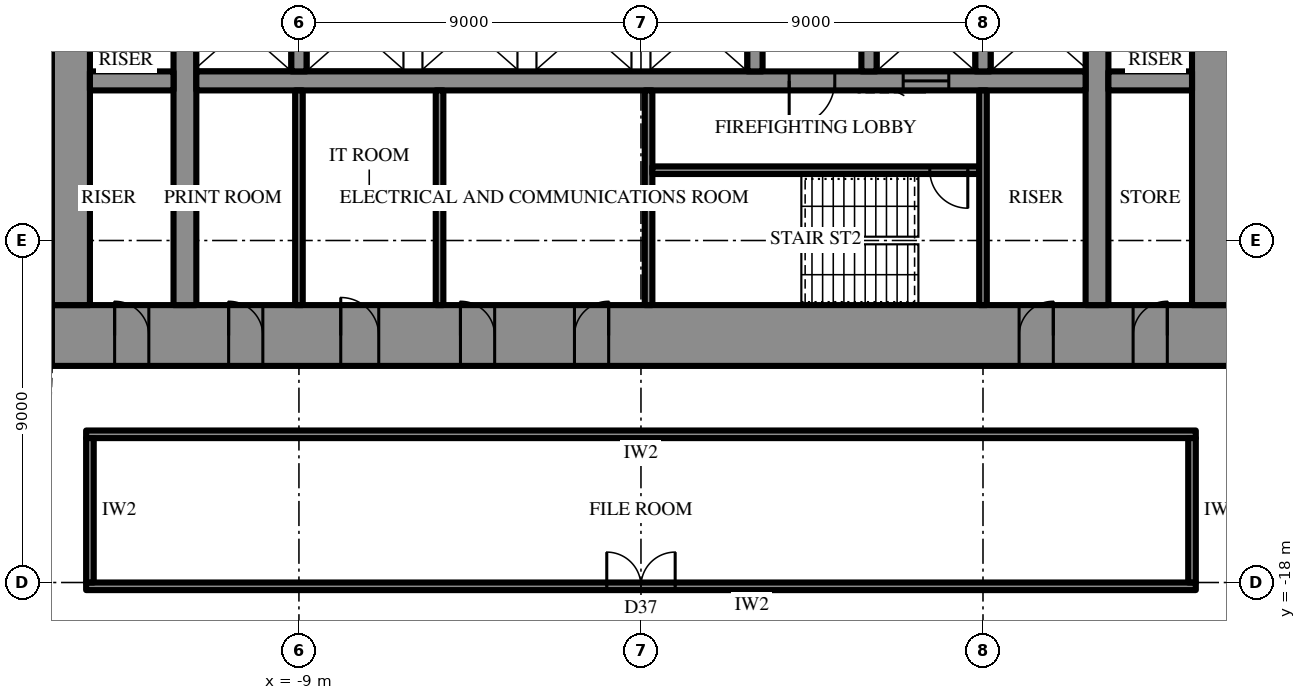
"""IFC4 building model, lengths in metres.
Left out: names, types, materials, properties, quantities, classifications, styles, units other than length and angle.
Written with IfcOpenShell. Run it as: python <this file> out.ifc"""

import sys

from ifc_helpers import new_model, si_unit, direction, frame, frame_2d, origin, place, context, subcontext, project, spatial, rectangle, extrude, element, fill, save


model = new_model("IFC4")
c1 = context("Model", 3, precision=1e-05, world=origin(), true_north=direction((0.0, 1.0)))
c2 = subcontext(c1, "Body", "Model", "MODEL_VIEW")
j1 = project(units=[si_unit("LENGTHUNIT", "METRE"), si_unit("PLANEANGLEUNIT", "RADIAN")], contexts=[c1])
p1 = place(None, origin())
s1 = spatial("IfcSite", under=j1, at=p1, CompositionType="ELEMENT")
p2 = place(p1, origin())
s2 = spatial("IfcBuilding", under=s1, at=p2, CompositionType="ELEMENT")
p3 = place(p2, frame((0.0, 0.0, 240.7)))
s3 = spatial("IfcBuildingStorey", under=s2, at=p3, CompositionType="ELEMENT", Elevation=240.7)
p4 = place(p3, frame((15.5, -11.5, 0.0), z_axis=(0.0, 0.0, 1.0), x_axis=(-1.0, 0.0, 0.0)))
e1 = element("IfcWall", 1, at=p4, inside=s3, PredefinedType="SHEAR", context=c2, shape_type="SweptSolid", body=[
    extrude(rectangle(XDim=31.0, YDim=1.6, at=frame_2d((15.5, 0.0))), origin(), (0.0, 0.0, 1.0), 4.2),
])
p5 = place(p4, frame((16.35, 0.0, 0.0)))
e2 = element("IfcOpeningElement", 2, at=p5, cuts=e1, PredefinedType="OPENING", context=c2, shape_type="SweptSolid", body=[
    extrude(rectangle(XDim=0.9, YDim=2.2, at=frame_2d((0.45, 1.1))), frame((0.0, 0.81, 0.0), z_axis=(0.0, -1.0, 0.0), x_axis=(1.0, 0.0, 0.0)), (0.0, 0.0, 1.0), 1.62),
])
p6 = place(p4, frame((19.35, 0.0, 0.0)))
e3 = element("IfcOpeningElement", 3, at=p6, cuts=e1, PredefinedType="OPENING", context=c2, shape_type="SweptSolid", body=[
    extrude(rectangle(XDim=0.9, YDim=2.2, at=frame_2d((0.45, 1.1))), frame((0.0, 0.81, 0.0), z_axis=(0.0, -1.0, 0.0), x_axis=(1.0, 0.0, 0.0)), (0.0, 0.0, 1.0), 1.62),
])
p7 = place(p4, frame((22.4, 0.0, 0.0)))
e4 = element("IfcOpeningElement", 4, at=p7, cuts=e1, PredefinedType="OPENING", context=c2, shape_type="SweptSolid", body=[
    extrude(rectangle(XDim=1.0, YDim=2.2, at=frame_2d((0.5, 1.1))), frame((0.0, 0.81, 0.0), z_axis=(0.0, -1.0, 0.0), x_axis=(1.0, 0.0, 0.0)), (0.0, 0.0, 1.0), 1.62),
])
p8 = place(p4, frame((1.65, 0.0, 0.0)))
e5 = element("IfcOpeningElement", 5, at=p8, cuts=e1, PredefinedType="OPENING", context=c2, shape_type="SweptSolid", body=[
    extrude(rectangle(XDim=0.9, YDim=2.2, at=frame_2d((0.45, 1.1))), frame((0.0, 0.81, 0.0), z_axis=(0.0, -1.0, 0.0), x_axis=(1.0, 0.0, 0.0)), (0.0, 0.0, 1.0), 1.62),
])
p9 = place(p4, frame((4.65, 0.0, 0.0)))
e6 = element("IfcOpeningElement", 6, at=p9, cuts=e1, PredefinedType="OPENING", context=c2, shape_type="SweptSolid", body=[
    extrude(rectangle(XDim=0.9, YDim=2.2, at=frame_2d((0.45, 1.1))), frame((0.0, 0.81, 0.0), z_axis=(0.0, -1.0, 0.0), x_axis=(1.0, 0.0, 0.0)), (0.0, 0.0, 1.0), 1.62),
])
p10 = place(p4, frame((25.45, 0.0, 0.0)))
e7 = element("IfcOpeningElement", 7, at=p10, cuts=e1, PredefinedType="OPENING", context=c2, shape_type="SweptSolid", body=[
    extrude(rectangle(XDim=0.9, YDim=2.2, at=frame_2d((0.45, 1.1))), frame((0.0, 0.81, 0.0), z_axis=(0.0, -1.0, 0.0), x_axis=(1.0, 0.0, 0.0)), (0.0, 0.0, 1.0), 1.62),
])
p11 = place(p4, frame((28.45, 0.0, 0.0)))
e8 = element("IfcOpeningElement", 8, at=p11, cuts=e1, PredefinedType="OPENING", context=c2, shape_type="SweptSolid", body=[
    extrude(rectangle(XDim=0.9, YDim=2.2, at=frame_2d((0.45, 1.1))), frame((0.0, 0.81, 0.0), z_axis=(0.0, -1.0, 0.0), x_axis=(1.0, 0.0, 0.0)), (0.0, 0.0, 1.0), 1.62),
])
p12 = place(p3, frame((15.0, -10.7, 0.0), z_axis=(0.0, 0.0, 1.0), x_axis=(0.0, 1.0, 0.0)))
e9 = element("IfcWall", 9, at=p12, inside=s3, PredefinedType="SHEAR", context=c2, shape_type="SweptSolid", body=[
    extrude(rectangle(XDim=21.4, YDim=1.0, at=frame_2d((10.7, 0.0))), origin(), (0.0, 0.0, 1.0), 4.2),
])
p13 = place(p12, frame((9.8, 0.0, 0.0)))
e10 = element("IfcOpeningElement", 10, at=p13, cuts=e9, PredefinedType="OPENING", context=c2, shape_type="SweptSolid", body=[
    extrude(rectangle(XDim=1.8, YDim=2.4, at=frame_2d((0.9, 1.2))), frame((0.0, 0.51, 0.0), z_axis=(0.0, -1.0, 0.0), x_axis=(1.0, 0.0, 0.0)), (0.0, 0.0, 1.0), 1.02),
])
p14 = place(p3, frame((-15.0, 10.7, 0.0), z_axis=(0.0, 0.0, 1.0), x_axis=(0.0, -1.0, 0.0)))
e11 = element("IfcWall", 11, at=p14, inside=s3, PredefinedType="SHEAR", context=c2, shape_type="SweptSolid", body=[
    extrude(rectangle(XDim=21.4, YDim=1.0, at=frame_2d((10.7, 0.0))), origin(), (0.0, 0.0, 1.0), 4.2),
])
p15 = place(p14, frame((9.8, 0.0, 0.0)))
e12 = element("IfcOpeningElement", 12, at=p15, cuts=e11, PredefinedType="OPENING", context=c2, shape_type="SweptSolid", body=[
    extrude(rectangle(XDim=1.8, YDim=2.4, at=frame_2d((0.9, 1.2))), frame((0.0, 0.51, 0.0), z_axis=(0.0, -1.0, 0.0), x_axis=(1.0, 0.0, 0.0)), (0.0, 0.0, 1.0), 1.02),
])
p16 = place(p3, frame((12.0, -10.7, 0.0), z_axis=(0.0, 0.0, 1.0), x_axis=(0.0, 1.0, 0.0)))
e13 = element("IfcWall", 13, at=p16, inside=s3, PredefinedType="SHEAR", context=c2, shape_type="SweptSolid", body=[
    extrude(rectangle(XDim=21.4, YDim=0.6, at=frame_2d((10.7, 0.0))), origin(), (0.0, 0.0, 1.0), 4.2),
])
p17 = place(p16, frame((9.8, 0.0, 0.0)))
e14 = element("IfcOpeningElement", 14, at=p17, cuts=e13, PredefinedType="OPENING", context=c2, shape_type="SweptSolid", body=[
    extrude(rectangle(XDim=1.8, YDim=2.4, at=frame_2d((0.9, 1.2))), frame((0.0, 0.31, 0.0), z_axis=(0.0, -1.0, 0.0), x_axis=(1.0, 0.0, 0.0)), (0.0, 0.0, 1.0), 0.62),
])
p18 = place(p3, frame((-12.0, -10.7, 0.0), z_axis=(0.0, 0.0, 1.0), x_axis=(0.0, 1.0, 0.0)))
e15 = element("IfcWall", 15, at=p18, inside=s3, PredefinedType="SHEAR", context=c2, shape_type="SweptSolid", body=[
    extrude(rectangle(XDim=21.4, YDim=0.6, at=frame_2d((10.7, 0.0))), origin(), (0.0, 0.0, 1.0), 4.2),
])
p19 = place(p18, frame((9.8, 0.0, 0.0)))
e16 = element("IfcOpeningElement", 16, at=p19, cuts=e15, PredefinedType="OPENING", context=c2, shape_type="SweptSolid", body=[
    extrude(rectangle(XDim=1.8, YDim=2.4, at=frame_2d((0.9, 1.2))), frame((0.0, 0.31, 0.0), z_axis=(0.0, -1.0, 0.0), x_axis=(1.0, 0.0, 0.0)), (0.0, 0.0, 1.0), 0.62),
])
p20 = place(p3, frame((14.5, -4.8, 0.0), z_axis=(0.0, 0.0, 1.0), x_axis=(-1.0, 0.0, 0.0)))
e17 = element("IfcWall", 17, at=p20, inside=s3, PredefinedType="SHEAR", context=c2, shape_type="SweptSolid", body=[
    extrude(rectangle(XDim=2.2, YDim=0.5, at=frame_2d((1.1, 0.0))), origin(), (0.0, 0.0, 1.0), 4.2),
])
p21 = place(p3, frame((11.7, -4.8, 0.0), z_axis=(0.0, 0.0, 1.0), x_axis=(-1.0, 0.0, 0.0)))
e18 = element("IfcWall", 18, at=p21, inside=s3, PredefinedType="SHEAR", context=c2, shape_type="SweptSolid", body=[
    extrude(rectangle(XDim=23.4, YDim=0.5, at=frame_2d((11.7, 0.0))), origin(), (0.0, 0.0, 1.0), 4.2),
])
p22 = place(p21, frame((6.6, 0.0, 0.0)))
e19 = element("IfcOpeningElement", 19, at=p22, cuts=e18, PredefinedType="OPENING", context=c2, shape_type="SweptSolid", body=[
    extrude(rectangle(XDim=1.2, YDim=2.2, at=frame_2d((0.6, 1.1))), frame((0.0, 0.26, 0.0), z_axis=(0.0, -1.0, 0.0), x_axis=(1.0, 0.0, 0.0)), (0.0, 0.0, 1.0), 0.52),
])
p23 = place(p21, frame((3.6, 0.0, 0.0)))
e20 = element("IfcOpeningElement", 20, at=p23, cuts=e18, PredefinedType="OPENING", context=c2, shape_type="SweptSolid", body=[
    extrude(rectangle(XDim=1.2, YDim=2.2, at=frame_2d((0.6, 1.1))), frame((0.0, 0.26, 0.0), z_axis=(0.0, -1.0, 0.0), x_axis=(1.0, 0.0, 0.0)), (0.0, 0.0, 1.0), 0.52),
])
p24 = place(p3, frame((-12.3, -4.8, 0.0), z_axis=(0.0, 0.0, 1.0), x_axis=(-1.0, 0.0, 0.0)))
e21 = element("IfcWall", 21, at=p24, inside=s3, PredefinedType="SHEAR", context=c2, shape_type="SweptSolid", body=[
    extrude(rectangle(XDim=2.2, YDim=0.5, at=frame_2d((1.1, 0.0))), origin(), (0.0, 0.0, 1.0), 4.2),
])
for number, where, z_axis, x_axis in (
    (22, (9.0, -2.25, 0.0), (0.0, 0.0, 1.0), (0.0, -1.0, 0.0)),
    (23, (6.0, -2.25, 0.0), (0.0, 0.0, 1.0), (0.0, -1.0, 0.0)),
    (24, (3.0, -2.25, 0.0), (0.0, 0.0, 1.0), (0.0, -1.0, 0.0)),
    (25, (-9.0, -2.25, 0.0), (0.0, 0.0, 1.0), (0.0, -1.0, 0.0)),
):
    element("IfcWall", number, at=place(p3, frame(where, z_axis=z_axis, x_axis=x_axis)), inside=s3, PredefinedType="SHEAR", context=c2, shape_type="SweptSolid", body=[
        extrude(rectangle(XDim=2.3, YDim=0.4, at=frame_2d((1.15, 0.0))), origin(), (0.0, 0.0, 1.0), 4.2),
    ])
p25 = place(p3, frame((0.2, -5.05, 0.0), z_axis=(0.0, 0.0, 1.0), x_axis=(0.0, -1.0, 0.0)))
e26 = element("IfcWall", 26, at=p25, inside=s3, PredefinedType="SHEAR", context=c2, shape_type="SweptSolid", body=[
    extrude(rectangle(XDim=5.65, YDim=0.2, at=frame_2d((2.825, 0.0))), origin(), (0.0, 0.0, 1.0), 4.2),
])
p26 = place(p3, frame((8.9, -7.15, 0.0), z_axis=(0.0, 0.0, 1.0), x_axis=(-1.0, 0.0, 0.0)))
e27 = element("IfcWall", 27, at=p26, inside=s3, PredefinedType="SHEAR", context=c2, shape_type="SweptSolid", body=[
    extrude(rectangle(XDim=8.6, YDim=0.2, at=frame_2d((4.3, 0.0))), origin(), (0.0, 0.0, 1.0), 4.2),
])
p27 = place(p26, frame((0.3, 0.0, 0.0)))
e28 = element("IfcOpeningElement", 28, at=p27, cuts=e27, PredefinedType="OPENING", context=c2, shape_type="SweptSolid", body=[
    extrude(rectangle(XDim=1.0, YDim=2.2, at=frame_2d((0.5, 1.1))), frame((0.0, 0.11, 0.0), z_axis=(0.0, -1.0, 0.0), x_axis=(1.0, 0.0, 0.0)), (0.0, 0.0, 1.0), 0.22),
])
for number, where, z_axis, x_axis in (
    (29, (9.0, -5.05, 0.0), (0.0, 0.0, 1.0), (0.0, -1.0, 0.0)),
    (30, (-9.0, -5.05, 0.0), (0.0, 0.0, 1.0), (0.0, -1.0, 0.0)),
    (31, (-5.3, -5.05, 0.0), (0.0, 0.0, 1.0), (0.0, -1.0, 0.0)),
):
    element("IfcWall", number, at=place(p3, frame(where, z_axis=z_axis, x_axis=x_axis)), inside=s3, PredefinedType="PARTITIONING", context=c2, shape_type="SweptSolid", body=[
        extrude(rectangle(XDim=5.65, YDim=0.2, at=frame_2d((2.825, 0.0))), origin(), (0.0, 0.0, 1.0), 4.0),
    ])
p28 = place(p3, frame((14.6, -14.1, 0.0), z_axis=(0.0, 0.0, 1.0), x_axis=(-1.0, 0.0, 0.0)))
e32 = element("IfcWall", 32, at=p28, inside=s3, PredefinedType="PARTITIONING", context=c2, shape_type="SweptSolid", body=[
    extrude(rectangle(XDim=29.2, YDim=0.2, at=frame_2d((14.6, 0.0))), origin(), (0.0, 0.0, 1.0), 4.0),
])
p29 = place(p3, frame((14.6, -18.1, 0.0), z_axis=(0.0, 0.0, 1.0), x_axis=(-1.0, 0.0, 0.0)))
e33 = element("IfcWall", 33, at=p29, inside=s3, PredefinedType="PARTITIONING", context=c2, shape_type="SweptSolid", body=[
    extrude(rectangle(XDim=29.2, YDim=0.2, at=frame_2d((14.6, 0.0))), origin(), (0.0, 0.0, 1.0), 4.0),
])
p30 = place(p29, frame((13.7, 0.0, 0.0)))
e34 = element("IfcOpeningElement", 34, at=p30, cuts=e33, PredefinedType="OPENING", context=c2, shape_type="SweptSolid", body=[
    extrude(rectangle(XDim=1.8, YDim=2.4, at=frame_2d((0.9, 1.2))), frame((0.0, 0.11, 0.0), z_axis=(0.0, -1.0, 0.0), x_axis=(1.0, 0.0, 0.0)), (0.0, 0.0, 1.0), 0.22),
])
for number, where, z_axis, x_axis in (
    (35, (14.5, -14.2, 0.0), (0.0, 0.0, 1.0), (0.0, -1.0, 0.0)),
    (36, (-14.5, -14.2, 0.0), (0.0, 0.0, 1.0), (0.0, -1.0, 0.0)),
):
    element("IfcWall", number, at=place(p3, frame(where, z_axis=z_axis, x_axis=x_axis)), inside=s3, PredefinedType="PARTITIONING", context=c2, shape_type="SweptSolid", body=[
        extrude(rectangle(XDim=3.8, YDim=0.2, at=frame_2d((1.9, 0.0))), origin(), (0.0, 0.0, 1.0), 4.0),
    ])
p31 = place(p22, origin())
e37 = element("IfcDoor", 37, at=p31, inside=s3, OperationType="SINGLE_SWING_LEFT", PredefinedType="DOOR", context=c2, shape_type="SweptSolid", body=[
    extrude(rectangle(XDim=1.2, YDim=2.2, at=frame_2d((0.6, 1.1))), frame((0.0, 0.025, 0.0), z_axis=(0.0, -1.0, 0.0), x_axis=(1.0, 0.0, 0.0)), (0.0, 0.0, 1.0), 0.05),
])
fill(e19, e37)
p32 = place(p27, origin())
e38 = element("IfcDoor", 38, at=p32, inside=s3, OperationType="SINGLE_SWING_RIGHT", PredefinedType="DOOR", context=c2, shape_type="SweptSolid", body=[
    extrude(rectangle(XDim=1.0, YDim=2.2, at=frame_2d((0.5, 1.1))), frame((0.0, 0.025, 0.0), z_axis=(0.0, -1.0, 0.0), x_axis=(1.0, 0.0, 0.0)), (0.0, 0.0, 1.0), 0.05),
])
fill(e28, e38)
p33 = place(p5, frame((0.9, 0.0, 0.0), z_axis=(0.0, 0.0, 1.0), x_axis=(-1.0, 0.0, 0.0)))
e39 = element("IfcDoor", 39, at=p33, inside=s3, OperationType="SINGLE_SWING_LEFT", PredefinedType="DOOR", context=c2, shape_type="SweptSolid", body=[
    extrude(rectangle(XDim=0.9, YDim=2.2, at=frame_2d((0.45, 1.1))), frame((0.0, 0.025, 0.0), z_axis=(0.0, -1.0, 0.0), x_axis=(1.0, 0.0, 0.0)), (0.0, 0.0, 1.0), 0.05),
])
fill(e2, e39)
p34 = place(p6, frame((0.9, 0.0, 0.0), z_axis=(0.0, 0.0, 1.0), x_axis=(-1.0, 0.0, 0.0)))
e40 = element("IfcDoor", 40, at=p34, inside=s3, OperationType="SINGLE_SWING_RIGHT", PredefinedType="DOOR", context=c2, shape_type="SweptSolid", body=[
    extrude(rectangle(XDim=0.9, YDim=2.2, at=frame_2d((0.45, 1.1))), frame((0.0, 0.025, 0.0), z_axis=(0.0, -1.0, 0.0), x_axis=(1.0, 0.0, 0.0)), (0.0, 0.0, 1.0), 0.05),
])
fill(e3, e40)
p35 = place(p7, frame((1.0, 0.0, 0.0), z_axis=(0.0, 0.0, 1.0), x_axis=(-1.0, 0.0, 0.0)))
e41 = element("IfcDoor", 41, at=p35, inside=s3, OperationType="SINGLE_SWING_RIGHT", PredefinedType="DOOR", context=c2, shape_type="SweptSolid", body=[
    extrude(rectangle(XDim=1.0, YDim=2.2, at=frame_2d((0.5, 1.1))), frame((0.0, 0.025, 0.0), z_axis=(0.0, -1.0, 0.0), x_axis=(1.0, 0.0, 0.0)), (0.0, 0.0, 1.0), 0.05),
])
fill(e4, e41)
p36 = place(p8, frame((0.9, 0.0, 0.0), z_axis=(0.0, 0.0, 1.0), x_axis=(-1.0, 0.0, 0.0)))
e42 = element("IfcDoor", 42, at=p36, inside=s3, OperationType="SINGLE_SWING_LEFT", PredefinedType="DOOR", context=c2, shape_type="SweptSolid", body=[
    extrude(rectangle(XDim=0.9, YDim=2.2, at=frame_2d((0.45, 1.1))), frame((0.0, 0.025, 0.0), z_axis=(0.0, -1.0, 0.0), x_axis=(1.0, 0.0, 0.0)), (0.0, 0.0, 1.0), 0.05),
])
fill(e5, e42)
p37 = place(p9, frame((0.9, 0.0, 0.0), z_axis=(0.0, 0.0, 1.0), x_axis=(-1.0, 0.0, 0.0)))
e43 = element("IfcDoor", 43, at=p37, inside=s3, OperationType="SINGLE_SWING_LEFT", PredefinedType="DOOR", context=c2, shape_type="SweptSolid", body=[
    extrude(rectangle(XDim=0.9, YDim=2.2, at=frame_2d((0.45, 1.1))), frame((0.0, 0.025, 0.0), z_axis=(0.0, -1.0, 0.0), x_axis=(1.0, 0.0, 0.0)), (0.0, 0.0, 1.0), 0.05),
])
fill(e6, e43)
p38 = place(p10, frame((0.9, 0.0, 0.0), z_axis=(0.0, 0.0, 1.0), x_axis=(-1.0, 0.0, 0.0)))
e44 = element("IfcDoor", 44, at=p38, inside=s3, OperationType="SINGLE_SWING_RIGHT", PredefinedType="DOOR", context=c2, shape_type="SweptSolid", body=[
    extrude(rectangle(XDim=0.9, YDim=2.2, at=frame_2d((0.45, 1.1))), frame((0.0, 0.025, 0.0), z_axis=(0.0, -1.0, 0.0), x_axis=(1.0, 0.0, 0.0)), (0.0, 0.0, 1.0), 0.05),
])
fill(e7, e44)
p39 = place(p11, frame((0.9, 0.0, 0.0), z_axis=(0.0, 0.0, 1.0), x_axis=(-1.0, 0.0, 0.0)))
e45 = element("IfcDoor", 45, at=p39, inside=s3, OperationType="SINGLE_SWING_RIGHT", PredefinedType="DOOR", context=c2, shape_type="SweptSolid", body=[
    extrude(rectangle(XDim=0.9, YDim=2.2, at=frame_2d((0.45, 1.1))), frame((0.0, 0.025, 0.0), z_axis=(0.0, -1.0, 0.0), x_axis=(1.0, 0.0, 0.0)), (0.0, 0.0, 1.0), 0.05),
])
fill(e8, e45)
p40 = place(p23, origin())
e46 = element("IfcDoor", 46, at=p40, inside=s3, OperationType="SLIDING_TO_LEFT", PredefinedType="DOOR", context=c2, shape_type="SweptSolid", body=[
    extrude(rectangle(XDim=1.2, YDim=2.2, at=frame_2d((0.6, 1.1))), frame((0.0, 0.025, 0.0), z_axis=(0.0, -1.0, 0.0), x_axis=(1.0, 0.0, 0.0)), (0.0, 0.0, 1.0), 0.05),
])
fill(e20, e46)
p41 = place(p30, frame((1.8, 0.0, 0.0), z_axis=(0.0, 0.0, 1.0), x_axis=(-1.0, 0.0, 0.0)))
e47 = element("IfcDoor", 47, at=p41, inside=s3, OperationType="DOUBLE_DOOR_SINGLE_SWING", PredefinedType="DOOR", context=c2, shape_type="SweptSolid", body=[
    extrude(rectangle(XDim=1.8, YDim=2.4, at=frame_2d((0.9, 1.2))), frame((0.0, 0.025, 0.0), z_axis=(0.0, -1.0, 0.0), x_axis=(1.0, 0.0, 0.0)), (0.0, 0.0, 1.0), 0.05),
])
fill(e34, e47)
save(model, sys.argv[1])
